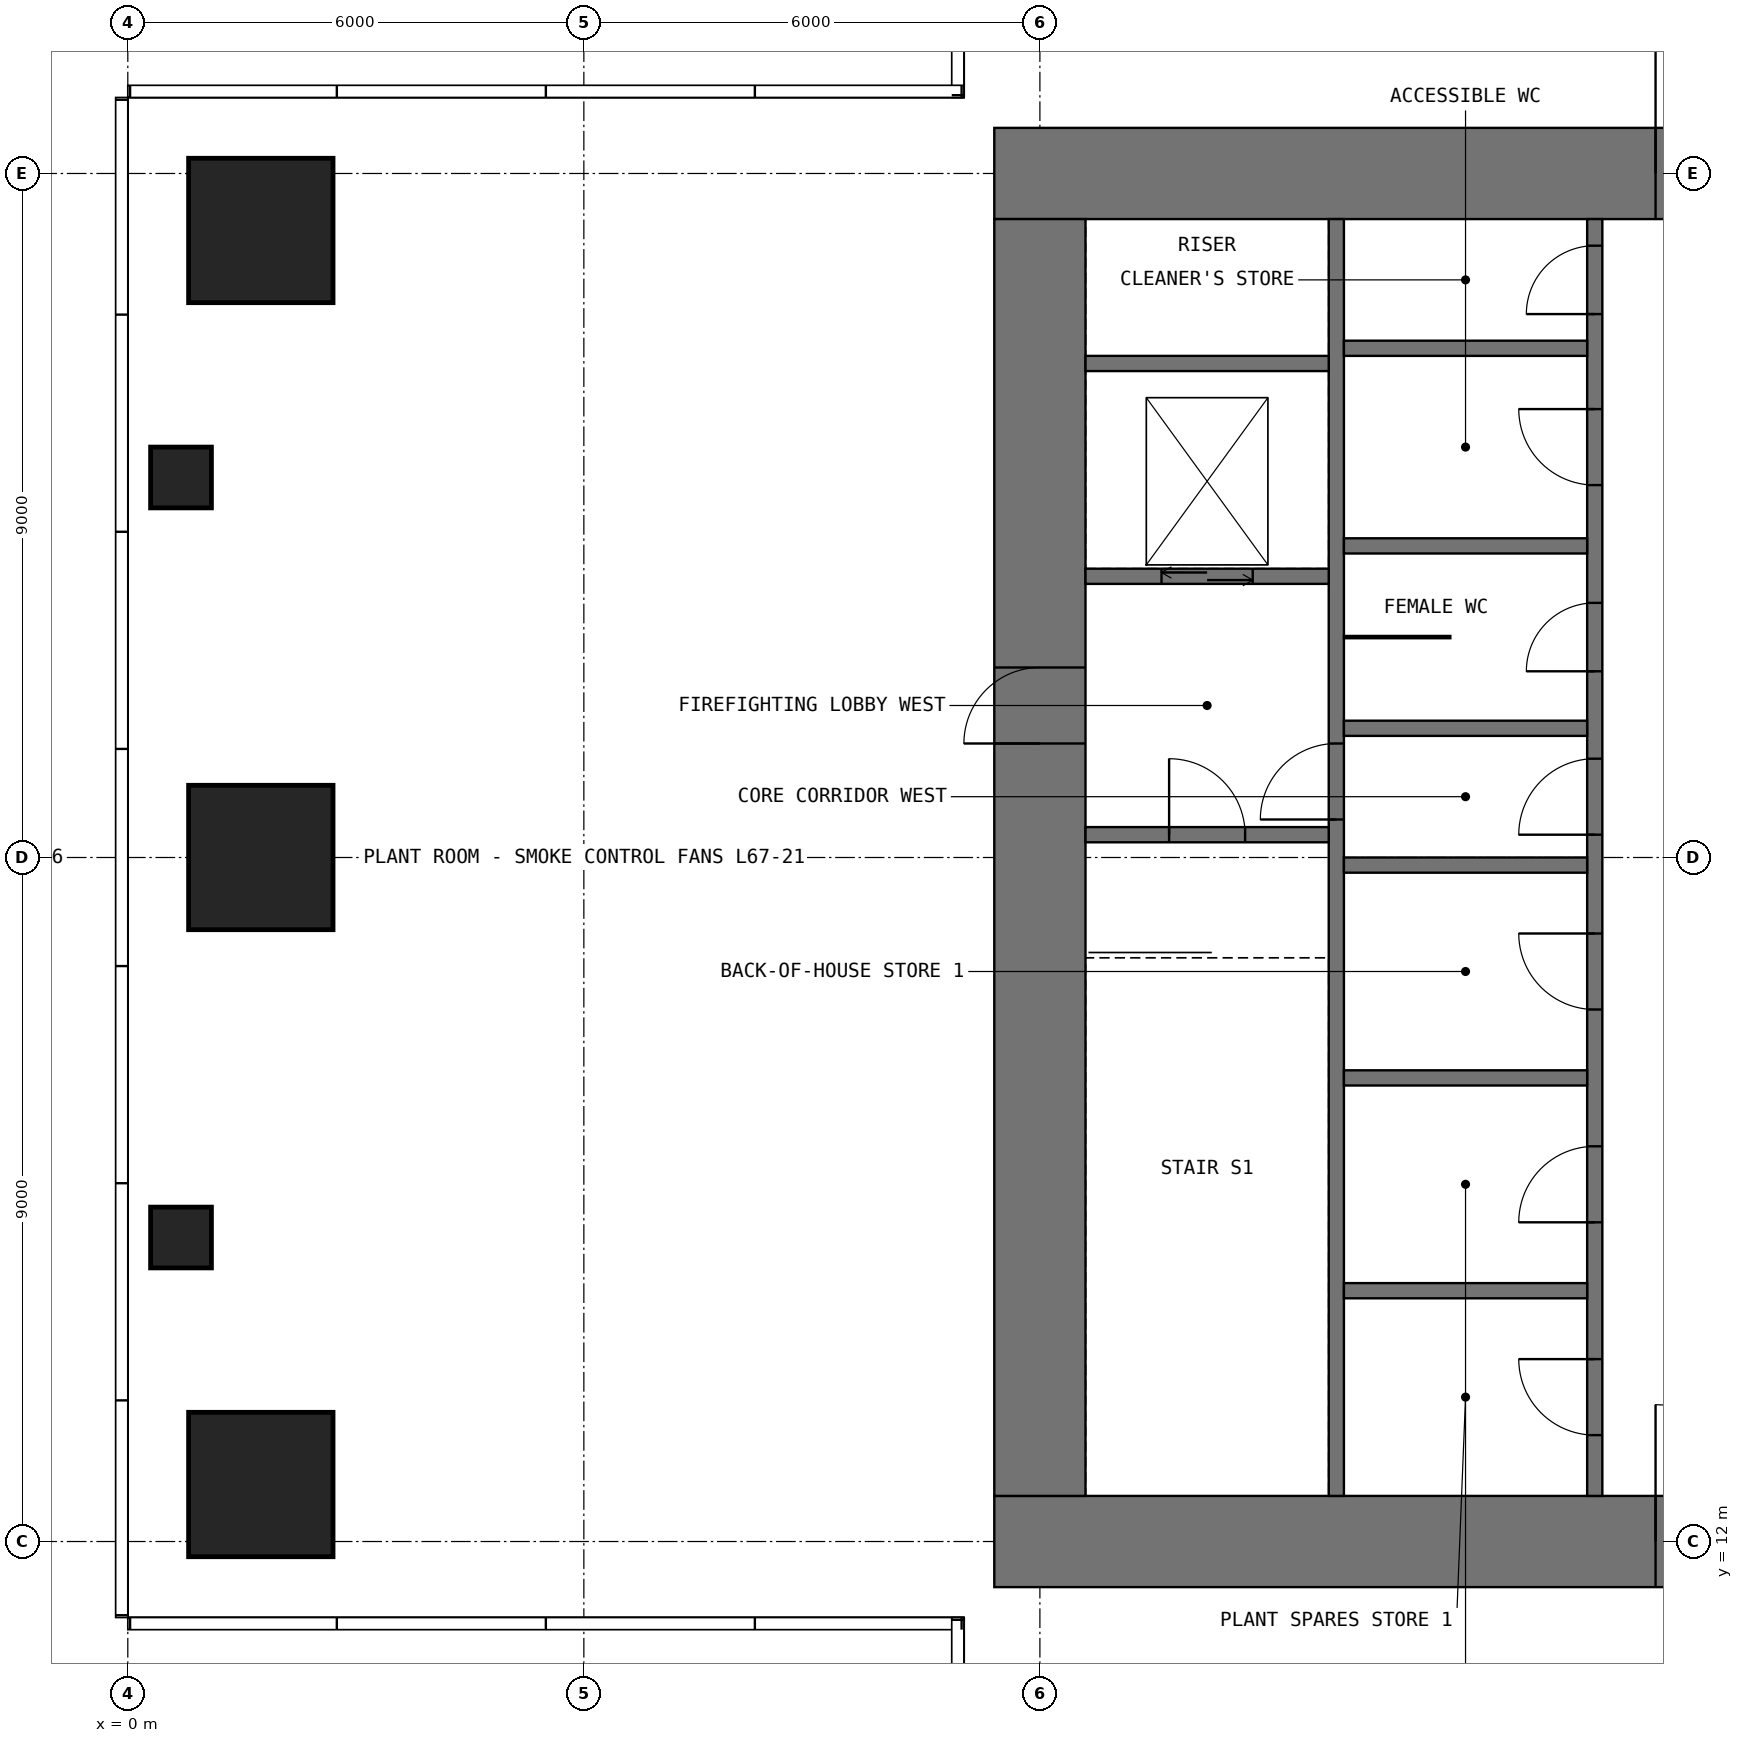
"""IFC4 building model, lengths in metres.
Left out: names, types, materials, properties, quantities, classifications, styles, units other than length and angle.
Written with IfcOpenShell. Run it as: python <this file> out.ifc"""

import sys

from ifc_helpers import new_model, si_unit, direction, frame, frame_2d, origin, origin_2d, place, context, subcontext, project, spatial, rectangle, extrude, element, fill, save


model = new_model("IFC4")
c1 = context("Model", 3, precision=1e-05, world=origin(), true_north=direction((0.0, 1.0)))
c2 = subcontext(c1, "Body", "Model", "MODEL_VIEW")
j1 = project(units=[si_unit("LENGTHUNIT", "METRE"), si_unit("PLANEANGLEUNIT", "RADIAN")], contexts=[c1])
p1 = place(None, origin())
s1 = spatial("IfcSite", under=j1, at=p1, CompositionType="ELEMENT")
p2 = place(p1, origin())
s2 = spatial("IfcBuilding", under=s1, at=p2, CompositionType="ELEMENT")
p3 = place(p2, frame((0.0, 0.0, 283.9)))
s3 = spatial("IfcBuildingStorey", under=s2, at=p3, CompositionType="ELEMENT", Elevation=283.9)
p4 = place(p3, frame((1.75, 12.75, 0.0), z_axis=(0.0, 0.0, 1.0), x_axis=(1.0, 0.0, 0.0)))
e1 = element("IfcColumn", 1, at=p4, inside=s3, PredefinedType="COLUMN", context=c2, shape_type="SweptSolid", body=[
    extrude(rectangle(XDim=1.9, YDim=1.9, at=origin_2d()), origin(), (0.0, 0.0, 1.0), 5.85),
])
p5 = place(p3, frame((0.7, 16.0, 0.0), z_axis=(0.0, 0.0, 1.0), x_axis=(1.0, 0.0, 0.0)))
e2 = element("IfcColumn", 2, at=p5, inside=s3, PredefinedType="COLUMN", context=c2, shape_type="SweptSolid", body=[
    extrude(rectangle(XDim=0.8, YDim=0.8, at=origin_2d()), origin(), (0.0, 0.0, 1.0), 5.85),
])
p6 = place(p3, frame((1.75, 21.0, 0.0), z_axis=(0.0, 0.0, 1.0), x_axis=(1.0, 0.0, 0.0)))
e3 = element("IfcColumn", 3, at=p6, inside=s3, PredefinedType="COLUMN", context=c2, shape_type="SweptSolid", body=[
    extrude(rectangle(XDim=1.9, YDim=1.9, at=origin_2d()), origin(), (0.0, 0.0, 1.0), 5.85),
])
p7 = place(p3, frame((0.7, 26.0, 0.0), z_axis=(0.0, 0.0, 1.0), x_axis=(1.0, 0.0, 0.0)))
e4 = element("IfcColumn", 4, at=p7, inside=s3, PredefinedType="COLUMN", context=c2, shape_type="SweptSolid", body=[
    extrude(rectangle(XDim=0.8, YDim=0.8, at=origin_2d()), origin(), (0.0, 0.0, 1.0), 5.85),
])
p8 = place(p3, frame((1.75, 29.25, 0.0), z_axis=(0.0, 0.0, 1.0), x_axis=(1.0, 0.0, 0.0)))
e5 = element("IfcColumn", 5, at=p8, inside=s3, PredefinedType="COLUMN", context=c2, shape_type="SweptSolid", body=[
    extrude(rectangle(XDim=1.9, YDim=1.9, at=origin_2d()), origin(), (0.0, 0.0, 1.0), 5.85),
])
p9 = place(p3, frame((11.4, 12.0, -0.1), z_axis=(0.0, 0.0, 1.0), x_axis=(1.0, 0.0, 0.0)))
e6 = element("IfcWall", 6, at=p9, inside=s3, PredefinedType="SHEAR", context=c2, shape_type="SweptSolid", body=[
    extrude(rectangle(XDim=19.2, YDim=1.2, at=frame_2d((9.6, 0.0))), origin(), (0.0, 0.0, 1.0), 5.95),
])
p10 = place(p9, frame((8.7, 0.0, 0.1)))
e7 = element("IfcOpeningElement", 7, at=p10, cuts=e6, PredefinedType="OPENING", context=c2, shape_type="SweptSolid", body=[
    extrude(rectangle(XDim=1.8, YDim=2.4, at=frame_2d((0.9, 1.2))), frame((0.0, 0.61, 0.0), z_axis=(0.0, -1.0, 0.0), x_axis=(1.0, 0.0, 0.0)), (0.0, 0.0, 1.0), 1.22),
])
p11 = place(p3, frame((11.4, 30.0, -0.1), z_axis=(0.0, 0.0, 1.0), x_axis=(1.0, 0.0, 0.0)))
e8 = element("IfcWall", 8, at=p11, inside=s3, PredefinedType="SHEAR", context=c2, shape_type="SweptSolid", body=[
    extrude(rectangle(XDim=19.2, YDim=1.2, at=frame_2d((9.6, 0.0))), origin(), (0.0, 0.0, 1.0), 5.95),
])
p12 = place(p11, frame((8.7, 0.0, 0.1)))
e9 = element("IfcOpeningElement", 9, at=p12, cuts=e8, PredefinedType="OPENING", context=c2, shape_type="SweptSolid", body=[
    extrude(rectangle(XDim=1.8, YDim=2.4, at=frame_2d((0.9, 1.2))), frame((0.0, 0.61, 0.0), z_axis=(0.0, -1.0, 0.0), x_axis=(1.0, 0.0, 0.0)), (0.0, 0.0, 1.0), 1.22),
])
p13 = place(p3, frame((12.0, 12.6, -0.1), z_axis=(0.0, 0.0, 1.0), x_axis=(0.0, 1.0, 0.0)))
e10 = element("IfcWall", 10, at=p13, inside=s3, PredefinedType="SHEAR", context=c2, shape_type="SweptSolid", body=[
    extrude(rectangle(XDim=16.8, YDim=1.2, at=frame_2d((8.4, 0.0))), origin(), (0.0, 0.0, 1.0), 5.95),
])
p14 = place(p13, frame((9.9, 0.0, 0.1)))
e11 = element("IfcOpeningElement", 11, at=p14, cuts=e10, PredefinedType="OPENING", context=c2, shape_type="SweptSolid", body=[
    extrude(rectangle(XDim=1.0, YDim=2.2, at=frame_2d((0.5, 1.1))), frame((0.0, 0.61, 0.0), z_axis=(0.0, -1.0, 0.0), x_axis=(1.0, 0.0, 0.0)), (0.0, 0.0, 1.0), 1.22),
])
p15 = place(p3, frame((15.9, 12.6, -0.1), z_axis=(0.0, 0.0, 1.0), x_axis=(0.0, 1.0, 0.0)))
e12 = element("IfcWall", 12, at=p15, inside=s3, PredefinedType="SHEAR", context=c2, shape_type="SweptSolid", body=[
    extrude(rectangle(XDim=16.8, YDim=0.2, at=frame_2d((8.4, 0.0))), origin(), (0.0, 0.0, 1.0), 5.95),
])
p16 = place(p15, frame((8.9, 0.0, 0.1)))
e13 = element("IfcOpeningElement", 13, at=p16, cuts=e12, PredefinedType="OPENING", context=c2, shape_type="SweptSolid", body=[
    extrude(rectangle(XDim=1.0, YDim=2.2, at=frame_2d((0.5, 1.1))), frame((0.0, 0.11, 0.0), z_axis=(0.0, -1.0, 0.0), x_axis=(1.0, 0.0, 0.0)), (0.0, 0.0, 1.0), 0.22),
])
p17 = place(p3, frame((19.3, 12.6, -0.1), z_axis=(0.0, 0.0, 1.0), x_axis=(0.0, 1.0, 0.0)))
e14 = element("IfcWall", 14, at=p17, inside=s3, PredefinedType="SHEAR", context=c2, shape_type="SweptSolid", body=[
    extrude(rectangle(XDim=16.8, YDim=0.2, at=frame_2d((8.4, 0.0))), origin(), (0.0, 0.0, 1.0), 5.95),
])
p18 = place(p17, frame((8.7, 0.0, 0.1)))
e15 = element("IfcOpeningElement", 15, at=p18, cuts=e14, PredefinedType="OPENING", context=c2, shape_type="SweptSolid", body=[
    extrude(rectangle(XDim=1.0, YDim=2.2, at=frame_2d((0.5, 1.1))), frame((0.0, 0.11, 0.0), z_axis=(0.0, -1.0, 0.0), x_axis=(1.0, 0.0, 0.0)), (0.0, 0.0, 1.0), 0.22),
])
p19 = place(p17, frame((10.85, 0.0, 0.1)))
e16 = element("IfcOpeningElement", 16, at=p19, cuts=e14, PredefinedType="OPENING", context=c2, shape_type="SweptSolid", body=[
    extrude(rectangle(XDim=0.9, YDim=2.2, at=frame_2d((0.45, 1.1))), frame((0.0, 0.11, 0.0), z_axis=(0.0, -1.0, 0.0), x_axis=(1.0, 0.0, 0.0)), (0.0, 0.0, 1.0), 0.22),
])
p20 = place(p17, frame((13.3, 0.0, 0.1)))
e17 = element("IfcOpeningElement", 17, at=p20, cuts=e14, PredefinedType="OPENING", context=c2, shape_type="SweptSolid", body=[
    extrude(rectangle(XDim=1.0, YDim=2.2, at=frame_2d((0.5, 1.1))), frame((0.0, 0.11, 0.0), z_axis=(0.0, -1.0, 0.0), x_axis=(1.0, 0.0, 0.0)), (0.0, 0.0, 1.0), 0.22),
])
p21 = place(p17, frame((15.55, 0.0, 0.1)))
e18 = element("IfcOpeningElement", 18, at=p21, cuts=e14, PredefinedType="OPENING", context=c2, shape_type="SweptSolid", body=[
    extrude(rectangle(XDim=0.9, YDim=2.2, at=frame_2d((0.45, 1.1))), frame((0.0, 0.11, 0.0), z_axis=(0.0, -1.0, 0.0), x_axis=(1.0, 0.0, 0.0)), (0.0, 0.0, 1.0), 0.22),
])
p22 = place(p17, frame((0.8, 0.0, 0.1)))
e19 = element("IfcOpeningElement", 19, at=p22, cuts=e14, PredefinedType="OPENING", context=c2, shape_type="SweptSolid", body=[
    extrude(rectangle(XDim=1.0, YDim=2.2, at=frame_2d((0.5, 1.1))), frame((0.0, 0.11, 0.0), z_axis=(0.0, -1.0, 0.0), x_axis=(1.0, 0.0, 0.0)), (0.0, 0.0, 1.0), 0.22),
])
p23 = place(p17, frame((3.6, 0.0, 0.1)))
e20 = element("IfcOpeningElement", 20, at=p23, cuts=e14, PredefinedType="OPENING", context=c2, shape_type="SweptSolid", body=[
    extrude(rectangle(XDim=1.0, YDim=2.2, at=frame_2d((0.5, 1.1))), frame((0.0, 0.11, 0.0), z_axis=(0.0, -1.0, 0.0), x_axis=(1.0, 0.0, 0.0)), (0.0, 0.0, 1.0), 0.22),
])
p24 = place(p17, frame((6.4, 0.0, 0.1)))
e21 = element("IfcOpeningElement", 21, at=p24, cuts=e14, PredefinedType="OPENING", context=c2, shape_type="SweptSolid", body=[
    extrude(rectangle(XDim=1.0, YDim=2.2, at=frame_2d((0.5, 1.1))), frame((0.0, 0.11, 0.0), z_axis=(0.0, -1.0, 0.0), x_axis=(1.0, 0.0, 0.0)), (0.0, 0.0, 1.0), 0.22),
])
p25 = place(p3, frame((12.6, 21.3, -0.1), z_axis=(0.0, 0.0, 1.0), x_axis=(1.0, 0.0, 0.0)))
e22 = element("IfcWall", 22, at=p25, inside=s3, PredefinedType="SHEAR", context=c2, shape_type="SweptSolid", body=[
    extrude(rectangle(XDim=3.2, YDim=0.2, at=frame_2d((1.6, 0.0))), origin(), (0.0, 0.0, 1.0), 5.95),
])
p26 = place(p25, frame((1.1, 0.0, 0.1)))
e23 = element("IfcOpeningElement", 23, at=p26, cuts=e22, PredefinedType="OPENING", context=c2, shape_type="SweptSolid", body=[
    extrude(rectangle(XDim=1.0, YDim=2.2, at=frame_2d((0.5, 1.1))), frame((0.0, 0.11, 0.0), z_axis=(0.0, -1.0, 0.0), x_axis=(1.0, 0.0, 0.0)), (0.0, 0.0, 1.0), 0.22),
])
p27 = place(p3, frame((12.6, 24.7, -0.1), z_axis=(0.0, 0.0, 1.0), x_axis=(1.0, 0.0, 0.0)))
e24 = element("IfcWall", 24, at=p27, inside=s3, PredefinedType="SHEAR", context=c2, shape_type="SweptSolid", body=[
    extrude(rectangle(XDim=3.2, YDim=0.2, at=frame_2d((1.6, 0.0))), origin(), (0.0, 0.0, 1.0), 5.95),
])
p28 = place(p27, frame((1.0, 0.0, 0.1)))
e25 = element("IfcOpeningElement", 25, at=p28, cuts=e24, PredefinedType="OPENING", context=c2, shape_type="SweptSolid", body=[
    extrude(rectangle(XDim=1.2, YDim=2.2, at=frame_2d((0.6, 1.1))), frame((0.0, 0.11, 0.0), z_axis=(0.0, -1.0, 0.0), x_axis=(1.0, 0.0, 0.0)), (0.0, 0.0, 1.0), 0.22),
])
for number, where, z_axis, x_axis in (
    (26, (12.6, 27.5, -0.1), (0.0, 0.0, 1.0), (1.0, 0.0, 0.0)),
    (27, (16.0, 15.3, -0.1), (0.0, 0.0, 1.0), (1.0, 0.0, 0.0)),
    (28, (16.0, 18.1, -0.1), (0.0, 0.0, 1.0), (1.0, 0.0, 0.0)),
    (29, (16.0, 20.9, -0.1), (0.0, 0.0, 1.0), (1.0, 0.0, 0.0)),
    (30, (16.0, 22.7, -0.1), (0.0, 0.0, 1.0), (1.0, 0.0, 0.0)),
    (31, (16.0, 25.1, -0.1), (0.0, 0.0, 1.0), (1.0, 0.0, 0.0)),
    (32, (16.0, 27.7, -0.1), (0.0, 0.0, 1.0), (1.0, 0.0, 0.0)),
):
    element("IfcWall", number, at=place(p3, frame(where, z_axis=z_axis, x_axis=x_axis)), inside=s3, PredefinedType="SHEAR", context=c2, shape_type="SweptSolid", body=[
        extrude(rectangle(XDim=3.2, YDim=0.2, at=frame_2d((1.6, 0.0))), origin(), (0.0, 0.0, 1.0), 5.95),
    ])
p29 = place(p3, frame((16.0, 23.9, 0.0), z_axis=(0.0, 0.0, 1.0), x_axis=(1.0, 0.0, 0.0)))
e33 = element("IfcWall", 33, at=p29, inside=s3, PredefinedType="PARTITIONING", context=c2, shape_type="SweptSolid", body=[
    extrude(rectangle(XDim=1.4, YDim=0.03, at=frame_2d((0.7, 0.0))), origin(), (0.0, 0.0, 1.0), 5.65),
])
p30 = place(p10, origin())
e34 = element("IfcDoor", 34, at=p30, inside=s3, OperationType="DOUBLE_DOOR_SINGLE_SWING", PredefinedType="DOOR", context=c2, shape_type="SweptSolid", body=[
    extrude(rectangle(XDim=1.8, YDim=2.4, at=frame_2d((0.9, 1.2))), frame((0.0, -0.275, 0.0), z_axis=(0.0, -1.0, 0.0), x_axis=(1.0, 0.0, 0.0)), (0.0, 0.0, 1.0), 0.05),
])
fill(e7, e34)
p31 = place(p12, origin())
e35 = element("IfcDoor", 35, at=p31, inside=s3, OperationType="DOUBLE_DOOR_SINGLE_SWING", PredefinedType="DOOR", context=c2, shape_type="SweptSolid", body=[
    extrude(rectangle(XDim=1.8, YDim=2.4, at=frame_2d((0.9, 1.2))), frame((0.0, 0.325, 0.0), z_axis=(0.0, -1.0, 0.0), x_axis=(1.0, 0.0, 0.0)), (0.0, 0.0, 1.0), 0.05),
])
fill(e9, e35)
p32 = place(p14, origin())
e36 = element("IfcDoor", 36, at=p32, inside=s3, OperationType="SINGLE_SWING_LEFT", PredefinedType="DOOR", context=c2, shape_type="SweptSolid", body=[
    extrude(rectangle(XDim=1.0, YDim=2.2, at=frame_2d((0.5, 1.1))), frame((0.0, 0.325, 0.0), z_axis=(0.0, -1.0, 0.0), x_axis=(1.0, 0.0, 0.0)), (0.0, 0.0, 1.0), 0.05),
])
fill(e11, e36)
p33 = place(p26, origin())
e37 = element("IfcDoor", 37, at=p33, inside=s3, OperationType="SINGLE_SWING_LEFT", PredefinedType="DOOR", context=c2, shape_type="SweptSolid", body=[
    extrude(rectangle(XDim=1.0, YDim=2.2, at=frame_2d((0.5, 1.1))), frame((0.0, 0.025, 0.0), z_axis=(0.0, -1.0, 0.0), x_axis=(1.0, 0.0, 0.0)), (0.0, 0.0, 1.0), 0.05),
])
fill(e23, e37)
p34 = place(p16, origin())
e38 = element("IfcDoor", 38, at=p34, inside=s3, OperationType="SINGLE_SWING_LEFT", PredefinedType="DOOR", context=c2, shape_type="SweptSolid", body=[
    extrude(rectangle(XDim=1.0, YDim=2.2, at=frame_2d((0.5, 1.1))), frame((0.0, 0.025, 0.0), z_axis=(0.0, -1.0, 0.0), x_axis=(1.0, 0.0, 0.0)), (0.0, 0.0, 1.0), 0.05),
])
fill(e13, e38)
p35 = place(p18, origin())
e39 = element("IfcDoor", 39, at=p35, inside=s3, OperationType="SINGLE_SWING_LEFT", PredefinedType="DOOR", context=c2, shape_type="SweptSolid", body=[
    extrude(rectangle(XDim=1.0, YDim=2.2, at=frame_2d((0.5, 1.1))), frame((0.0, 0.025, 0.0), z_axis=(0.0, -1.0, 0.0), x_axis=(1.0, 0.0, 0.0)), (0.0, 0.0, 1.0), 0.05),
])
fill(e15, e39)
p36 = place(p19, origin())
e40 = element("IfcDoor", 40, at=p36, inside=s3, OperationType="SINGLE_SWING_LEFT", PredefinedType="DOOR", context=c2, shape_type="SweptSolid", body=[
    extrude(rectangle(XDim=0.9, YDim=2.2, at=frame_2d((0.45, 1.1))), frame((0.0, 0.025, 0.0), z_axis=(0.0, -1.0, 0.0), x_axis=(1.0, 0.0, 0.0)), (0.0, 0.0, 1.0), 0.05),
])
fill(e16, e40)
p37 = place(p20, origin())
e41 = element("IfcDoor", 41, at=p37, inside=s3, OperationType="SINGLE_SWING_RIGHT", PredefinedType="DOOR", context=c2, shape_type="SweptSolid", body=[
    extrude(rectangle(XDim=1.0, YDim=2.2, at=frame_2d((0.5, 1.1))), frame((0.0, 0.025, 0.0), z_axis=(0.0, -1.0, 0.0), x_axis=(1.0, 0.0, 0.0)), (0.0, 0.0, 1.0), 0.05),
])
fill(e17, e41)
p38 = place(p21, origin())
e42 = element("IfcDoor", 42, at=p38, inside=s3, OperationType="SINGLE_SWING_LEFT", PredefinedType="DOOR", context=c2, shape_type="SweptSolid", body=[
    extrude(rectangle(XDim=0.9, YDim=2.2, at=frame_2d((0.45, 1.1))), frame((0.0, 0.025, 0.0), z_axis=(0.0, -1.0, 0.0), x_axis=(1.0, 0.0, 0.0)), (0.0, 0.0, 1.0), 0.05),
])
fill(e18, e42)
p39 = place(p22, origin())
e43 = element("IfcDoor", 43, at=p39, inside=s3, OperationType="SINGLE_SWING_RIGHT", PredefinedType="DOOR", context=c2, shape_type="SweptSolid", body=[
    extrude(rectangle(XDim=1.0, YDim=2.2, at=frame_2d((0.5, 1.1))), frame((0.0, 0.025, 0.0), z_axis=(0.0, -1.0, 0.0), x_axis=(1.0, 0.0, 0.0)), (0.0, 0.0, 1.0), 0.05),
])
fill(e19, e43)
p40 = place(p23, origin())
e44 = element("IfcDoor", 44, at=p40, inside=s3, OperationType="SINGLE_SWING_LEFT", PredefinedType="DOOR", context=c2, shape_type="SweptSolid", body=[
    extrude(rectangle(XDim=1.0, YDim=2.2, at=frame_2d((0.5, 1.1))), frame((0.0, 0.025, 0.0), z_axis=(0.0, -1.0, 0.0), x_axis=(1.0, 0.0, 0.0)), (0.0, 0.0, 1.0), 0.05),
])
fill(e20, e44)
p41 = place(p24, origin())
e45 = element("IfcDoor", 45, at=p41, inside=s3, OperationType="SINGLE_SWING_RIGHT", PredefinedType="DOOR", context=c2, shape_type="SweptSolid", body=[
    extrude(rectangle(XDim=1.0, YDim=2.2, at=frame_2d((0.5, 1.1))), frame((0.0, 0.025, 0.0), z_axis=(0.0, -1.0, 0.0), x_axis=(1.0, 0.0, 0.0)), (0.0, 0.0, 1.0), 0.05),
])
fill(e21, e45)
p42 = place(p28, origin())
e46 = element("IfcDoor", 46, at=p42, inside=s3, OperationType="DOUBLE_DOOR_SLIDING", PredefinedType="DOOR", context=c2, shape_type="SweptSolid", body=[
    extrude(rectangle(XDim=1.2, YDim=2.2, at=frame_2d((0.6, 1.1))), frame((0.0, 0.025, 0.0), z_axis=(0.0, -1.0, 0.0), x_axis=(1.0, 0.0, 0.0)), (0.0, 0.0, 1.0), 0.05),
])
fill(e25, e46)
save(model, sys.argv[1])
